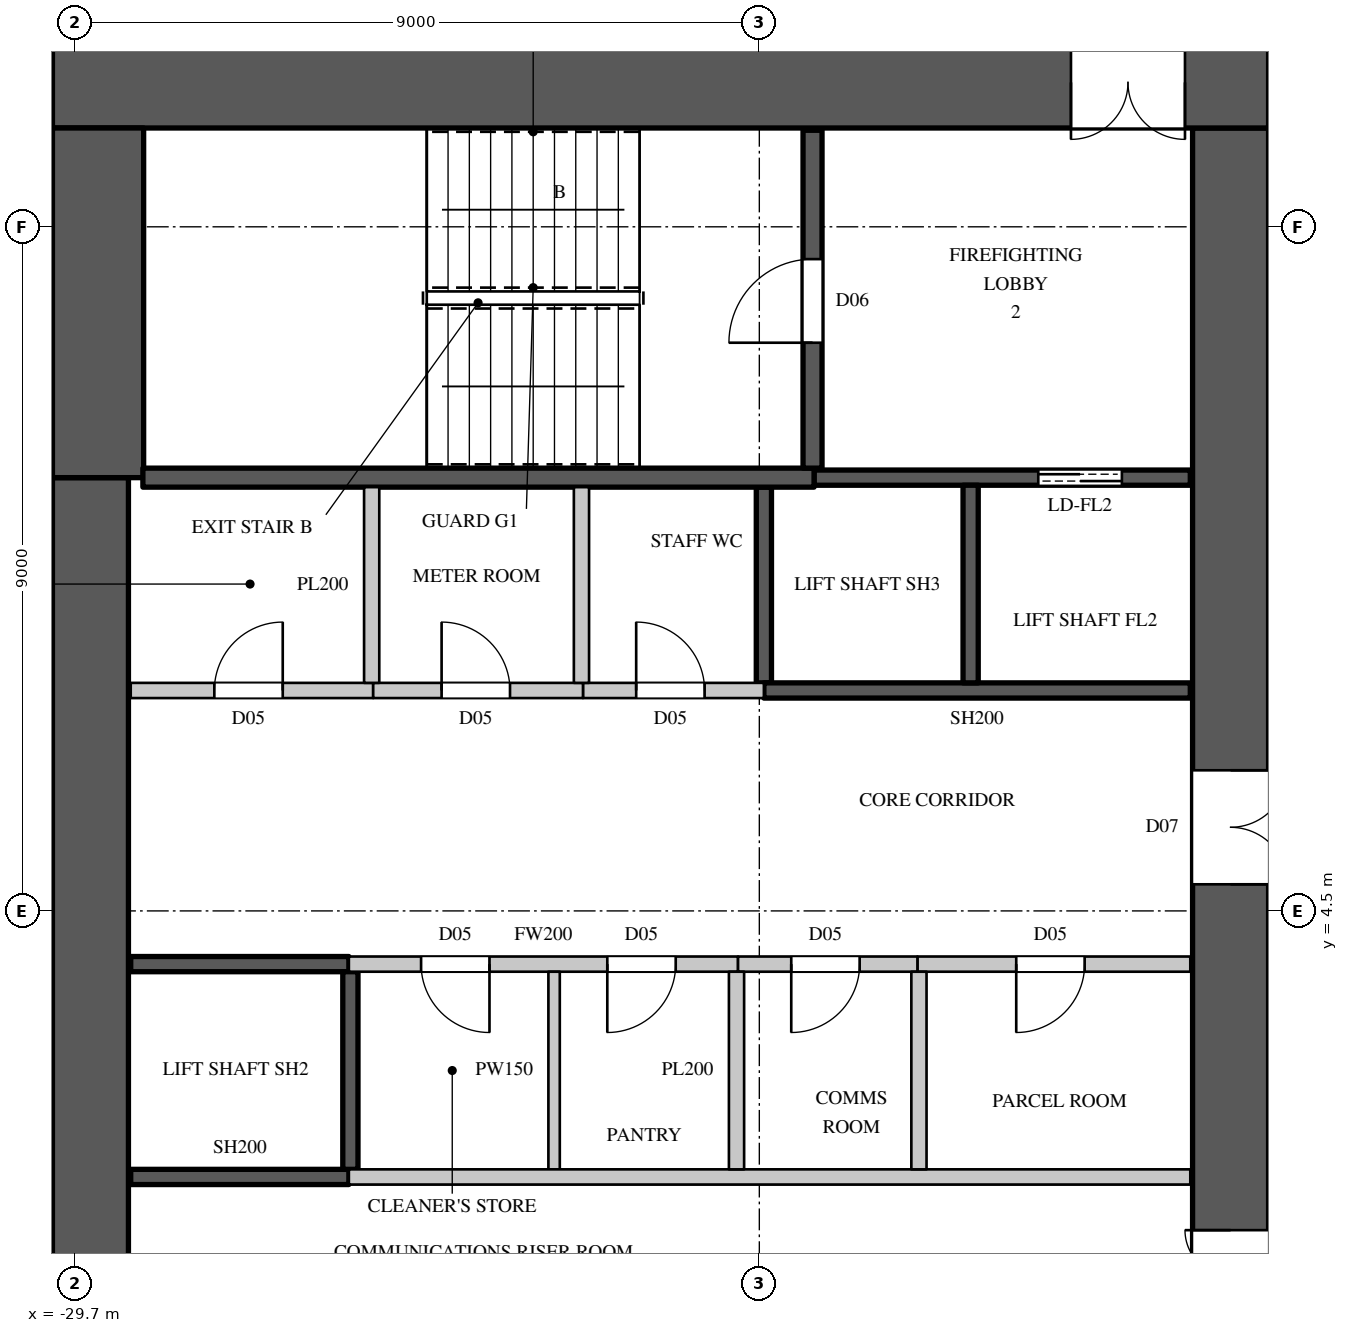
"""IFC4 building model, lengths in metres.
Left out: names, types, materials, properties, quantities, classifications, styles, units other than length and angle.
Written with IfcOpenShell. Run it as: python <this file> out.ifc"""

import sys

from ifc_helpers import new_model, si_unit, direction, frame, frame_2d, origin, place, context, subcontext, project, spatial, rectangle, extrude, element, fill, save


model = new_model("IFC4")
c1 = context("Model", 3, precision=1e-05, world=origin(), true_north=direction((0.0, 1.0)))
c2 = subcontext(c1, "Body", "Model", "MODEL_VIEW")
j1 = project(units=[si_unit("LENGTHUNIT", "METRE"), si_unit("PLANEANGLEUNIT", "RADIAN")], contexts=[c1])
p1 = place(None, origin())
s1 = spatial("IfcSite", under=j1, at=p1, CompositionType="ELEMENT")
p2 = place(p1, origin())
s2 = spatial("IfcBuilding", under=s1, at=p2, CompositionType="ELEMENT")
p3 = place(p2, frame((0.0, 0.0, 77.1)))
s3 = spatial("IfcBuildingStorey", under=s2, at=p3, CompositionType="ELEMENT", Elevation=77.1)
p4 = place(p3, frame((-30.0, 15.4, 0.0), z_axis=(0.0, 0.0, 1.0), x_axis=(1.0, 0.0, 0.0)))
e1 = element("IfcWall", 1, at=p4, inside=s3, PredefinedType="SHEAR", context=c2, shape_type="SweptSolid", body=[
    extrude(rectangle(XDim=16.0, YDim=1.2, at=frame_2d((8.0, 0.0))), origin(), (0.0, 0.0, 1.0), 3.6),
])
p5 = place(p4, frame((13.4, 0.0, 0.0)))
e2 = element("IfcOpeningElement", 2, at=p5, cuts=e1, PredefinedType="OPENING", context=c2, shape_type="SweptSolid", body=[
    extrude(rectangle(XDim=1.5, YDim=2.4, at=frame_2d((0.75, 1.2))), frame((0.0, 0.61, 0.0), z_axis=(0.0, -1.0, 0.0), x_axis=(1.0, 0.0, 0.0)), (0.0, 0.0, 1.0), 1.22),
])
p6 = place(p3, frame((-14.5, -14.8, 0.0), z_axis=(0.0, 0.0, 1.0), x_axis=(0.0, 1.0, 0.0)))
e3 = element("IfcWall", 3, at=p6, inside=s3, PredefinedType="SHEAR", context=c2, shape_type="SweptSolid", body=[
    extrude(rectangle(XDim=29.6, YDim=1.0, at=frame_2d((14.8, 0.0))), origin(), (0.0, 0.0, 1.0), 3.6),
])
p7 = place(p6, frame((8.45, 0.0, 0.0)))
e4 = element("IfcOpeningElement", 4, at=p7, cuts=e3, PredefinedType="OPENING", context=c2, shape_type="SweptSolid", body=[
    extrude(rectangle(XDim=1.5, YDim=2.4, at=frame_2d((0.75, 1.2))), frame((0.0, 0.51, 0.0), z_axis=(0.0, -1.0, 0.0), x_axis=(1.0, 0.0, 0.0)), (0.0, 0.0, 1.0), 1.02),
])
p8 = place(p6, frame((19.65, 0.0, 0.0)))
e5 = element("IfcOpeningElement", 5, at=p8, cuts=e3, PredefinedType="OPENING", context=c2, shape_type="SweptSolid", body=[
    extrude(rectangle(XDim=1.5, YDim=2.4, at=frame_2d((0.75, 1.2))), frame((0.0, 0.51, 0.0), z_axis=(0.0, -1.0, 0.0), x_axis=(1.0, 0.0, 0.0)), (0.0, 0.0, 1.0), 1.02),
])
p9 = place(p6, frame((14.5, 0.0, 0.0)))
e6 = element("IfcOpeningElement", 6, at=p9, cuts=e3, PredefinedType="OPENING", context=c2, shape_type="SweptSolid", body=[
    extrude(rectangle(XDim=0.6, YDim=2.0, at=frame_2d((0.3, 1.0))), frame((0.0, 0.51, 0.0), z_axis=(0.0, -1.0, 0.0), x_axis=(1.0, 0.0, 0.0)), (0.0, 0.0, 1.0), 1.02),
])
p10 = place(p3, frame((-29.5, -10.2, 0.0), z_axis=(0.0, 0.0, 1.0), x_axis=(0.0, 1.0, 0.0)))
e7 = element("IfcWall", 7, at=p10, inside=s3, PredefinedType="SHEAR", context=c2, shape_type="SweptSolid", body=[
    extrude(rectangle(XDim=20.4, YDim=1.0, at=frame_2d((10.2, 0.0))), origin(), (0.0, 0.0, 1.0), 3.6),
])
p11 = place(p3, frame((-29.4, 10.2, 0.0), z_axis=(0.0, 0.0, 1.0), x_axis=(0.0, 1.0, 0.0)))
e8 = element("IfcWall", 8, at=p11, inside=s3, PredefinedType="SHEAR", context=c2, shape_type="SweptSolid", body=[
    extrude(rectangle(XDim=4.6, YDim=1.2, at=frame_2d((2.3, 0.0))), origin(), (0.0, 0.0, 1.0), 3.6),
])
p12 = place(p3, frame((-28.97, 7.4, 0.0), z_axis=(0.0, 0.0, 1.0), x_axis=(1.0, 0.0, 0.0)))
e9 = element("IfcWall", 9, at=p12, inside=s3, PredefinedType="PARTITIONING", context=c2, shape_type="SweptSolid", body=[
    extrude(rectangle(XDim=3.19, YDim=0.2, at=frame_2d((1.595, 0.0))), origin(), (0.0, 0.0, 1.0), 3.3),
])
p13 = place(p12, frame((1.1, 0.0, 0.0)))
e10 = element("IfcOpeningElement", 10, at=p13, cuts=e9, PredefinedType="OPENING", context=c2, shape_type="SweptSolid", body=[
    extrude(rectangle(XDim=0.9, YDim=2.2, at=frame_2d((0.45, 1.1))), frame((0.0, 0.11, 0.0), z_axis=(0.0, -1.0, 0.0), x_axis=(1.0, 0.0, 0.0)), (0.0, 0.0, 1.0), 0.22),
])
p14 = place(p3, frame((-26.1, 3.8, 0.0), z_axis=(0.0, 0.0, 1.0), x_axis=(1.0, 0.0, 0.0)))
e11 = element("IfcWall", 11, at=p14, inside=s3, PredefinedType="PARTITIONING", context=c2, shape_type="SweptSolid", body=[
    extrude(rectangle(XDim=5.12, YDim=0.2, at=frame_2d((2.56, 0.0))), origin(), (0.0, 0.0, 1.0), 3.3),
])
p15 = place(p14, frame((0.95, 0.0, 0.0)))
e12 = element("IfcOpeningElement", 12, at=p15, cuts=e11, PredefinedType="OPENING", context=c2, shape_type="SweptSolid", body=[
    extrude(rectangle(XDim=0.9, YDim=2.2, at=frame_2d((0.45, 1.1))), frame((0.0, 0.11, 0.0), z_axis=(0.0, -1.0, 0.0), x_axis=(1.0, 0.0, 0.0)), (0.0, 0.0, 1.0), 0.22),
])
p16 = place(p14, frame((3.4, 0.0, 0.0)))
e13 = element("IfcOpeningElement", 13, at=p16, cuts=e11, PredefinedType="OPENING", context=c2, shape_type="SweptSolid", body=[
    extrude(rectangle(XDim=0.9, YDim=2.2, at=frame_2d((0.45, 1.1))), frame((0.0, 0.11, 0.0), z_axis=(0.0, -1.0, 0.0), x_axis=(1.0, 0.0, 0.0)), (0.0, 0.0, 1.0), 0.22),
])
p17 = place(p3, frame((-23.02, 7.4, 0.0), z_axis=(0.0, 0.0, 1.0), x_axis=(1.0, 0.0, 0.0)))
e14 = element("IfcWall", 14, at=p17, inside=s3, PredefinedType="PARTITIONING", context=c2, shape_type="SweptSolid", body=[
    extrude(rectangle(XDim=2.38, YDim=0.2, at=frame_2d((1.19, 0.0))), origin(), (0.0, 0.0, 1.0), 3.3),
])
p18 = place(p17, frame((0.7, 0.0, 0.0)))
e15 = element("IfcOpeningElement", 15, at=p18, cuts=e14, PredefinedType="OPENING", context=c2, shape_type="SweptSolid", body=[
    extrude(rectangle(XDim=0.9, YDim=2.2, at=frame_2d((0.45, 1.1))), frame((0.0, 0.11, 0.0), z_axis=(0.0, -1.0, 0.0), x_axis=(1.0, 0.0, 0.0)), (0.0, 0.0, 1.0), 0.22),
])
p19 = place(p3, frame((-18.62, 3.8, 0.0), z_axis=(0.0, 0.0, 1.0), x_axis=(1.0, 0.0, 0.0)))
e16 = element("IfcWall", 16, at=p19, inside=s3, PredefinedType="PARTITIONING", context=c2, shape_type="SweptSolid", body=[
    extrude(rectangle(XDim=3.59, YDim=0.2, at=frame_2d((1.795, 0.0))), origin(), (0.0, 0.0, 1.0), 3.3),
])
p20 = place(p19, frame((1.3, 0.0, 0.0)))
e17 = element("IfcOpeningElement", 17, at=p20, cuts=e16, PredefinedType="OPENING", context=c2, shape_type="SweptSolid", body=[
    extrude(rectangle(XDim=0.9, YDim=2.2, at=frame_2d((0.45, 1.1))), frame((0.0, 0.11, 0.0), z_axis=(0.0, -1.0, 0.0), x_axis=(1.0, 0.0, 0.0)), (0.0, 0.0, 1.0), 0.22),
])
p21 = place(p3, frame((-23.4, 1.1, 0.0), z_axis=(0.0, 0.0, 1.0), x_axis=(0.0, 1.0, 0.0)))
e18 = element("IfcWall", 18, at=p21, inside=s3, PredefinedType="PARTITIONING", context=c2, shape_type="SweptSolid", body=[
    extrude(rectangle(XDim=2.6, YDim=0.15, at=frame_2d((1.3, 0.0))), origin(), (0.0, 0.0, 1.0), 3.3),
])
p22 = place(p3, frame((-26.1, 1.0, 0.0), z_axis=(0.0, 0.0, 1.0), x_axis=(1.0, 0.0, 0.0)))
e19 = element("IfcWall", 19, at=p22, inside=s3, PredefinedType="PARTITIONING", context=c2, shape_type="SweptSolid", body=[
    extrude(rectangle(XDim=11.07, YDim=0.2, at=frame_2d((5.535, 0.0))), origin(), (0.0, 0.0, 1.0), 3.3),
])
p23 = place(p3, frame((-25.78, 7.4, 0.0), z_axis=(0.0, 0.0, 1.0), x_axis=(1.0, 0.0, 0.0)))
e20 = element("IfcWall", 20, at=p23, inside=s3, PredefinedType="PARTITIONING", context=c2, shape_type="SweptSolid", body=[
    extrude(rectangle(XDim=2.76, YDim=0.2, at=frame_2d((1.38, 0.0))), origin(), (0.0, 0.0, 1.0), 3.3),
])
p24 = place(p23, frame((0.9, 0.0, 0.0)))
e21 = element("IfcOpeningElement", 21, at=p24, cuts=e20, PredefinedType="OPENING", context=c2, shape_type="SweptSolid", body=[
    extrude(rectangle(XDim=0.9, YDim=2.2, at=frame_2d((0.45, 1.1))), frame((0.0, 0.11, 0.0), z_axis=(0.0, -1.0, 0.0), x_axis=(1.0, 0.0, 0.0)), (0.0, 0.0, 1.0), 0.22),
])
for number, where, z_axis, x_axis in (
    (22, (-25.8, 7.5, 0.0), (0.0, 0.0, 1.0), (0.0, 1.0, 0.0)),
    (23, (-23.04, 7.5, 0.0), (0.0, 0.0, 1.0), (0.0, 1.0, 0.0)),
):
    element("IfcWall", number, at=place(p3, frame(where, z_axis=z_axis, x_axis=x_axis)), inside=s3, PredefinedType="PARTITIONING", context=c2, shape_type="SweptSolid", body=[
        extrude(rectangle(XDim=2.575, YDim=0.2, at=frame_2d((1.288, 0.0))), origin(), (0.0, 0.0, 1.0), 3.3),
    ])
p25 = place(p3, frame((-20.98, 3.8, 0.0), z_axis=(0.0, 0.0, 1.0), x_axis=(1.0, 0.0, 0.0)))
e24 = element("IfcWall", 24, at=p25, inside=s3, PredefinedType="PARTITIONING", context=c2, shape_type="SweptSolid", body=[
    extrude(rectangle(XDim=2.36, YDim=0.2, at=frame_2d((1.18, 0.0))), origin(), (0.0, 0.0, 1.0), 3.3),
])
p26 = place(p25, frame((0.7, 0.0, 0.0)))
e25 = element("IfcOpeningElement", 25, at=p26, cuts=e24, PredefinedType="OPENING", context=c2, shape_type="SweptSolid", body=[
    extrude(rectangle(XDim=0.9, YDim=2.2, at=frame_2d((0.45, 1.1))), frame((0.0, 0.11, 0.0), z_axis=(0.0, -1.0, 0.0), x_axis=(1.0, 0.0, 0.0)), (0.0, 0.0, 1.0), 0.22),
])
for number, where, z_axis, x_axis in (
    (26, (-21.0, 1.1, 0.0), (0.0, 0.0, 1.0), (0.0, 1.0, 0.0)),
    (27, (-18.6, 1.1, 0.0), (0.0, 0.0, 1.0), (0.0, 1.0, 0.0)),
):
    element("IfcWall", number, at=place(p3, frame(where, z_axis=z_axis, x_axis=x_axis)), inside=s3, PredefinedType="PARTITIONING", context=c2, shape_type="SweptSolid", body=[
        extrude(rectangle(XDim=2.6, YDim=0.2, at=frame_2d((1.3, 0.0))), origin(), (0.0, 0.0, 1.0), 3.3),
    ])
for number, where, z_axis, x_axis in (
    (28, (-28.97, 1.0, 0.0), (0.0, 0.0, 1.0), (1.0, 0.0, 0.0)),
    (29, (-28.97, 3.8, 0.0), (0.0, 0.0, 1.0), (1.0, 0.0, 0.0)),
):
    element("IfcWall", number, at=place(p3, frame(where, z_axis=z_axis, x_axis=x_axis)), inside=s3, PredefinedType="SHEAR", context=c2, shape_type="SweptSolid", body=[
        extrude(rectangle(XDim=2.87, YDim=0.2, at=frame_2d((1.435, 0.0))), origin(), (0.0, 0.0, 1.0), 3.3),
    ])
p27 = place(p3, frame((-26.08, 1.1, 0.0), z_axis=(0.0, 0.0, 1.0), x_axis=(0.0, 1.0, 0.0)))
e30 = element("IfcWall", 30, at=p27, inside=s3, PredefinedType="SHEAR", context=c2, shape_type="SweptSolid", body=[
    extrude(rectangle(XDim=2.6, YDim=0.2, at=frame_2d((1.3, 0.0))), origin(), (0.0, 0.0, 1.0), 3.3),
])
p28 = place(p3, frame((-20.64, 7.5, 0.0), z_axis=(0.0, 0.0, 1.0), x_axis=(0.0, 1.0, 0.0)))
e31 = element("IfcWall", 31, at=p28, inside=s3, PredefinedType="SHEAR", context=c2, shape_type="SweptSolid", body=[
    extrude(rectangle(XDim=2.575, YDim=0.2, at=frame_2d((1.288, 0.0))), origin(), (0.0, 0.0, 1.0), 3.3),
])
p29 = place(p3, frame((-20.64, 7.4, 0.0), z_axis=(0.0, 0.0, 1.0), x_axis=(1.0, 0.0, 0.0)))
e32 = element("IfcWall", 32, at=p29, inside=s3, PredefinedType="SHEAR", context=c2, shape_type="SweptSolid", body=[
    extrude(rectangle(XDim=5.61, YDim=0.2, at=frame_2d((2.805, 0.0))), origin(), (0.0, 0.0, 1.0), 3.3),
])
p30 = place(p3, frame((-19.98, 10.2, 0.0), z_axis=(0.0, 0.0, 1.0), x_axis=(1.0, 0.0, 0.0)))
e33 = element("IfcWall", 33, at=p30, inside=s3, PredefinedType="SHEAR", context=c2, shape_type="SweptSolid", body=[
    extrude(rectangle(XDim=4.95, YDim=0.2, at=frame_2d((2.475, 0.0))), origin(), (0.0, 0.0, 1.0), 3.3),
])
p31 = place(p30, frame((2.95, 0.0, 0.0)))
e34 = element("IfcOpeningElement", 34, at=p31, cuts=e33, PredefinedType="OPENING", context=c2, shape_type="SweptSolid", body=[
    extrude(rectangle(XDim=1.1, YDim=2.2, at=frame_2d((0.55, 1.1))), frame((0.0, 0.11, 0.0), z_axis=(0.0, -1.0, 0.0), x_axis=(1.0, 0.0, 0.0)), (0.0, 0.0, 1.0), 0.22),
])
p32 = place(p3, frame((-17.92, 7.5, 0.0), z_axis=(0.0, 0.0, 1.0), x_axis=(0.0, 1.0, 0.0)))
e35 = element("IfcWall", 35, at=p32, inside=s3, PredefinedType="SHEAR", context=c2, shape_type="SweptSolid", body=[
    extrude(rectangle(XDim=2.6, YDim=0.2, at=frame_2d((1.3, 0.0))), origin(), (0.0, 0.0, 1.0), 3.6),
])
p33 = place(p3, frame((-28.81, 10.2, 0.0), z_axis=(0.0, 0.0, 1.0), x_axis=(1.0, 0.0, 0.0)))
e36 = element("IfcWall", 36, at=p33, inside=s3, PredefinedType="SHEAR", context=c2, shape_type="SweptSolid", body=[
    extrude(rectangle(XDim=8.83, YDim=0.25, at=frame_2d((4.415, 0.0))), origin(), (0.0, 0.0, 1.0), 3.3),
])
p34 = place(p3, frame((-20.0, 10.325, 0.0), z_axis=(0.0, 0.0, 1.0), x_axis=(0.0, 1.0, 0.0)))
e37 = element("IfcWall", 37, at=p34, inside=s3, PredefinedType="SHEAR", context=c2, shape_type="SweptSolid", body=[
    extrude(rectangle(XDim=4.445, YDim=0.25, at=frame_2d((2.223, 0.0))), origin(), (0.0, 0.0, 1.0), 3.3),
])
p35 = place(p34, frame((1.65, 0.0, 0.0)))
e38 = element("IfcOpeningElement", 38, at=p35, cuts=e37, PredefinedType="OPENING", context=c2, shape_type="SweptSolid", body=[
    extrude(rectangle(XDim=1.1, YDim=2.2, at=frame_2d((0.55, 1.1))), frame((0.0, 0.135, 0.0), z_axis=(0.0, -1.0, 0.0), x_axis=(1.0, 0.0, 0.0)), (0.0, 0.0, 1.0), 0.27),
])
p36 = place(p35, origin())
e39 = element("IfcDoor", 39, at=p36, inside=s3, OperationType="SINGLE_SWING_LEFT", PredefinedType="DOOR", context=c2, shape_type="SweptSolid", body=[
    extrude(rectangle(XDim=1.1, YDim=2.2, at=frame_2d((0.55, 1.1))), frame((0.0, 0.025, 0.0), z_axis=(0.0, -1.0, 0.0), x_axis=(1.0, 0.0, 0.0)), (0.0, 0.0, 1.0), 0.05),
])
fill(e38, e39)
p37 = place(p15, origin())
e40 = element("IfcDoor", 40, at=p37, inside=s3, OperationType="SINGLE_SWING_LEFT", PredefinedType="DOOR", context=c2, shape_type="SweptSolid", body=[
    extrude(rectangle(XDim=0.9, YDim=2.2, at=frame_2d((0.45, 1.1))), frame((0.0, 0.025, 0.0), z_axis=(0.0, -1.0, 0.0), x_axis=(1.0, 0.0, 0.0)), (0.0, 0.0, 1.0), 0.05),
])
fill(e12, e40)
p38 = place(p16, origin())
e41 = element("IfcDoor", 41, at=p38, inside=s3, OperationType="SINGLE_SWING_RIGHT", PredefinedType="DOOR", context=c2, shape_type="SweptSolid", body=[
    extrude(rectangle(XDim=0.9, YDim=2.2, at=frame_2d((0.45, 1.1))), frame((0.0, 0.025, 0.0), z_axis=(0.0, -1.0, 0.0), x_axis=(1.0, 0.0, 0.0)), (0.0, 0.0, 1.0), 0.05),
])
fill(e13, e41)
p39 = place(p26, origin())
e42 = element("IfcDoor", 42, at=p39, inside=s3, OperationType="SINGLE_SWING_RIGHT", PredefinedType="DOOR", context=c2, shape_type="SweptSolid", body=[
    extrude(rectangle(XDim=0.9, YDim=2.2, at=frame_2d((0.45, 1.1))), frame((0.0, 0.025, 0.0), z_axis=(0.0, -1.0, 0.0), x_axis=(1.0, 0.0, 0.0)), (0.0, 0.0, 1.0), 0.05),
])
fill(e25, e42)
p40 = place(p20, origin())
e43 = element("IfcDoor", 43, at=p40, inside=s3, OperationType="SINGLE_SWING_RIGHT", PredefinedType="DOOR", context=c2, shape_type="SweptSolid", body=[
    extrude(rectangle(XDim=0.9, YDim=2.2, at=frame_2d((0.45, 1.1))), frame((0.0, 0.025, 0.0), z_axis=(0.0, -1.0, 0.0), x_axis=(1.0, 0.0, 0.0)), (0.0, 0.0, 1.0), 0.05),
])
fill(e17, e43)
p41 = place(p13, origin())
e44 = element("IfcDoor", 44, at=p41, inside=s3, OperationType="SINGLE_SWING_RIGHT", PredefinedType="DOOR", context=c2, shape_type="SweptSolid", body=[
    extrude(rectangle(XDim=0.9, YDim=2.2, at=frame_2d((0.45, 1.1))), frame((0.0, 0.025, 0.0), z_axis=(0.0, -1.0, 0.0), x_axis=(1.0, 0.0, 0.0)), (0.0, 0.0, 1.0), 0.05),
])
fill(e10, e44)
p42 = place(p24, origin())
e45 = element("IfcDoor", 45, at=p42, inside=s3, OperationType="SINGLE_SWING_LEFT", PredefinedType="DOOR", context=c2, shape_type="SweptSolid", body=[
    extrude(rectangle(XDim=0.9, YDim=2.2, at=frame_2d((0.45, 1.1))), frame((0.0, 0.025, 0.0), z_axis=(0.0, -1.0, 0.0), x_axis=(1.0, 0.0, 0.0)), (0.0, 0.0, 1.0), 0.05),
])
fill(e21, e45)
p43 = place(p18, origin())
e46 = element("IfcDoor", 46, at=p43, inside=s3, OperationType="SINGLE_SWING_LEFT", PredefinedType="DOOR", context=c2, shape_type="SweptSolid", body=[
    extrude(rectangle(XDim=0.9, YDim=2.2, at=frame_2d((0.45, 1.1))), frame((0.0, 0.025, 0.0), z_axis=(0.0, -1.0, 0.0), x_axis=(1.0, 0.0, 0.0)), (0.0, 0.0, 1.0), 0.05),
])
fill(e15, e46)
p44 = place(p31, origin())
e47 = element("IfcDoor", 47, at=p44, inside=s3, OperationType="DOUBLE_DOOR_SLIDING", PredefinedType="DOOR", context=c2, shape_type="SweptSolid", body=[
    extrude(rectangle(XDim=1.1, YDim=2.2, at=frame_2d((0.55, 1.1))), frame((0.0, 0.025, 0.0), z_axis=(0.0, -1.0, 0.0), x_axis=(1.0, 0.0, 0.0)), (0.0, 0.0, 1.0), 0.05),
])
fill(e34, e47)
p45 = place(p5, origin())
e48 = element("IfcDoor", 48, at=p45, inside=s3, OperationType="DOUBLE_DOOR_SINGLE_SWING", PredefinedType="DOOR", context=c2, shape_type="SweptSolid", body=[
    extrude(rectangle(XDim=1.5, YDim=2.4, at=frame_2d((0.75, 1.2))), frame((0.0, 0.025, 0.0), z_axis=(0.0, -1.0, 0.0), x_axis=(1.0, 0.0, 0.0)), (0.0, 0.0, 1.0), 0.05),
])
fill(e2, e48)
p46 = place(p8, origin())
e49 = element("IfcDoor", 49, at=p46, inside=s3, OperationType="DOUBLE_DOOR_SINGLE_SWING", PredefinedType="DOOR", context=c2, shape_type="SweptSolid", body=[
    extrude(rectangle(XDim=1.5, YDim=2.4, at=frame_2d((0.75, 1.2))), frame((0.0, -0.445, 0.0), z_axis=(0.0, -1.0, 0.0), x_axis=(1.0, 0.0, 0.0)), (0.0, 0.0, 1.0), 0.05),
])
fill(e5, e49)
p47 = place(p9, origin())
e50 = element("IfcDoor", 50, at=p47, inside=s3, OperationType="SINGLE_SWING_RIGHT", PredefinedType="DOOR", context=c2, shape_type="SweptSolid", body=[
    extrude(rectangle(XDim=0.6, YDim=2.0, at=frame_2d((0.3, 1.0))), frame((0.0, 0.495, 0.0), z_axis=(0.0, -1.0, 0.0), x_axis=(1.0, 0.0, 0.0)), (0.0, 0.0, 1.0), 0.05),
])
fill(e6, e50)
save(model, sys.argv[1])
